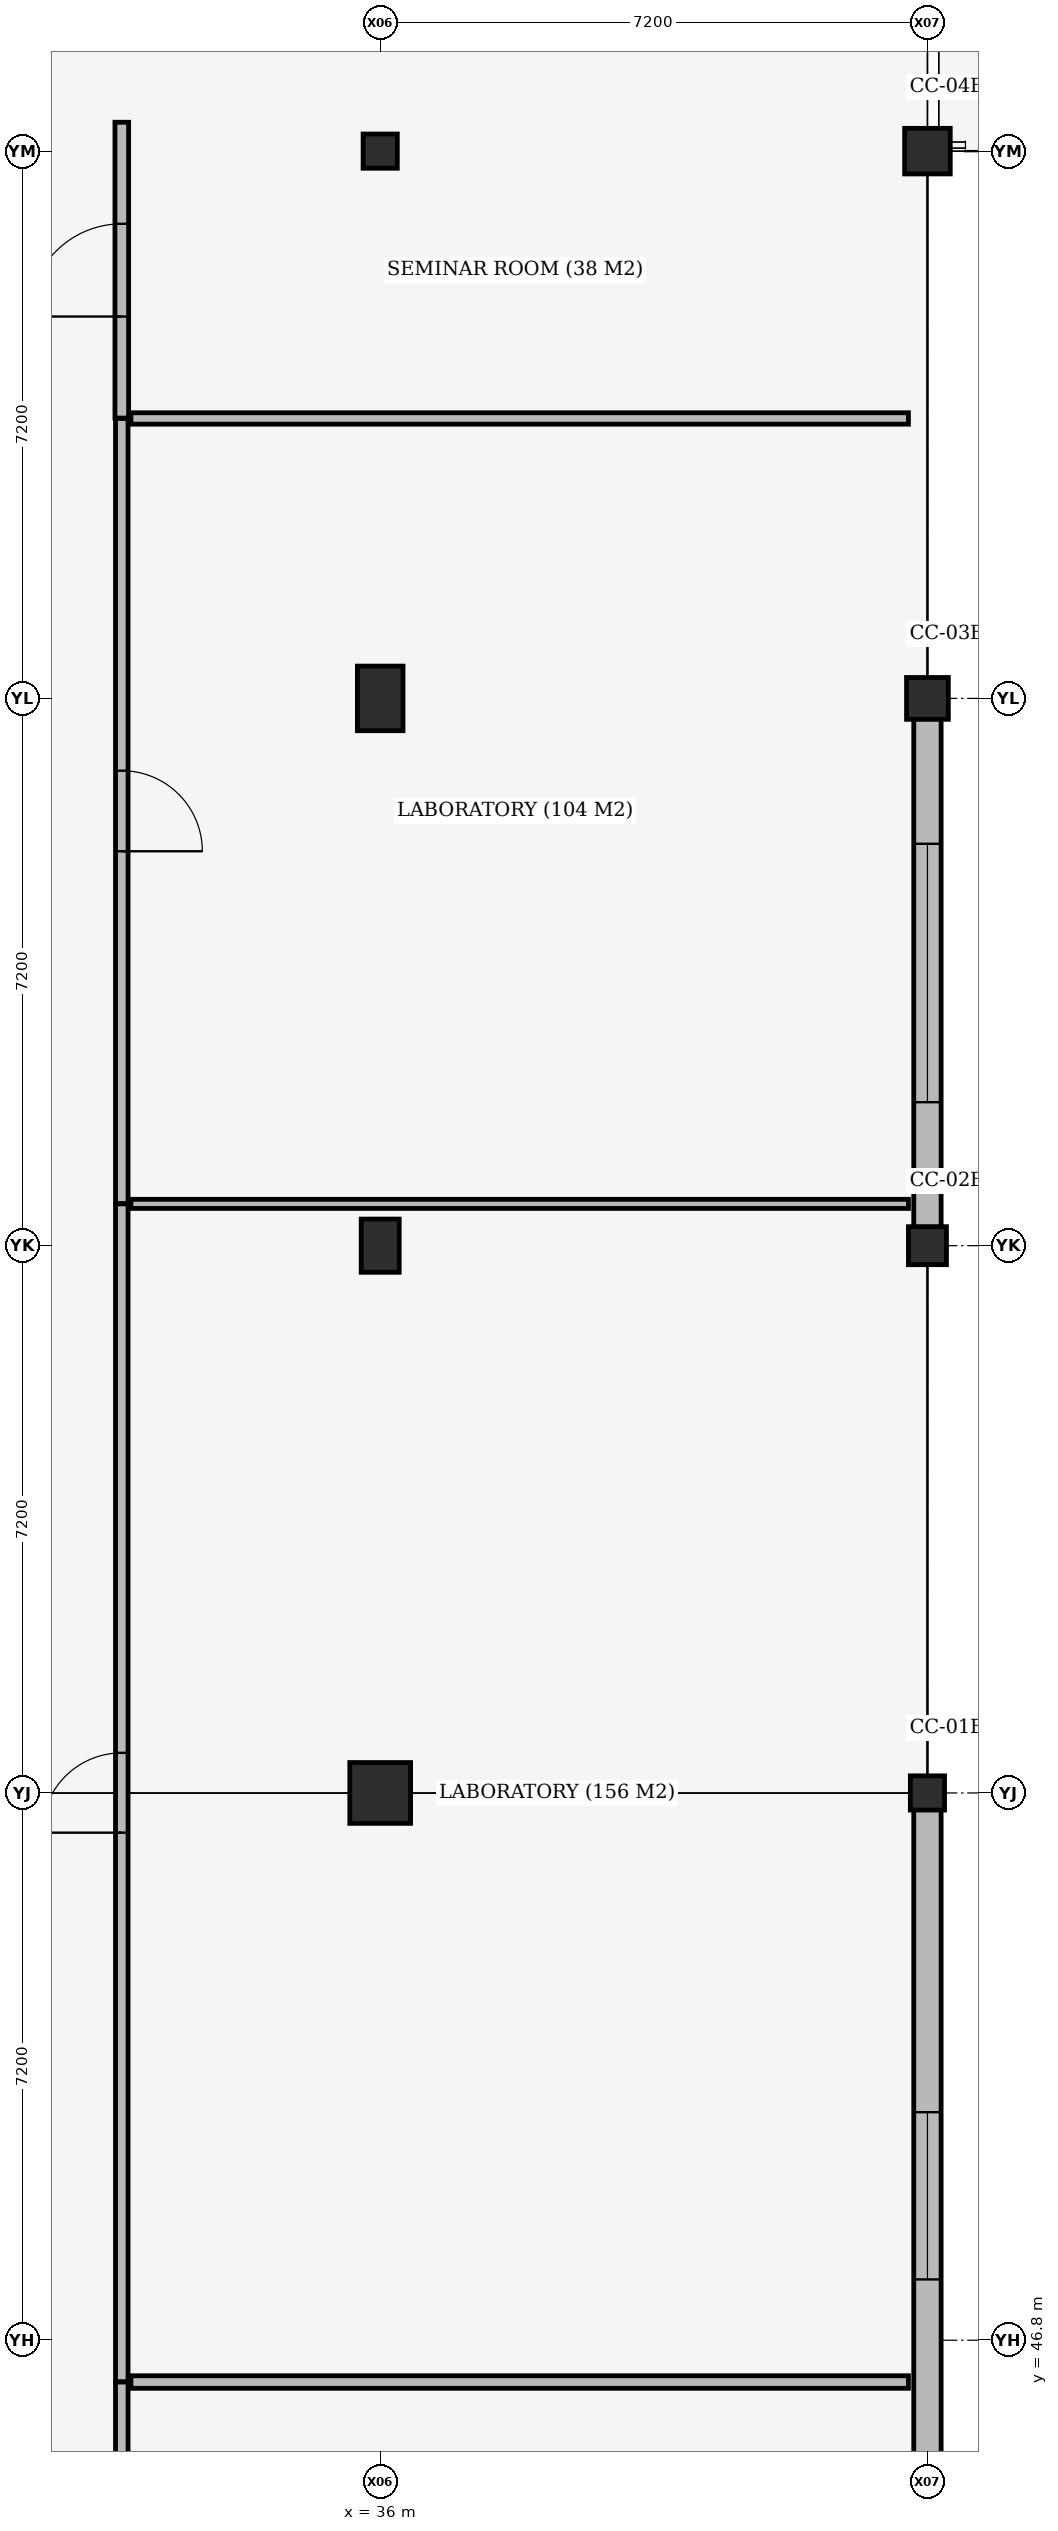
"""IFC4 building model, lengths in metres.
Left out: names, types, materials, properties, quantities, classifications, styles, units other than length and angle.
Written with IfcOpenShell. Run it as: python <this file> out.ifc"""

import sys

from ifc_helpers import new_model, si_unit, direction, frame, frame_2d, origin, origin_2d, place, context, subcontext, project, spatial, rectangle, extrude, element, fill, save


model = new_model("IFC4")
c1 = context("Model", 3, precision=1e-05, world=origin(), true_north=direction((0.0, 1.0)))
c2 = subcontext(c1, "Body", "Model", "MODEL_VIEW")
j1 = project(units=[si_unit("LENGTHUNIT", "METRE"), si_unit("PLANEANGLEUNIT", "RADIAN")], contexts=[c1])
p1 = place(None, origin())
s1 = spatial("IfcSite", under=j1, at=p1, CompositionType="ELEMENT")
p2 = place(p1, origin())
s2 = spatial("IfcBuilding", under=s1, at=p2, CompositionType="ELEMENT")
p3 = place(p2, frame((0.0, 0.0, 5.4)))
s3 = spatial("IfcBuildingStorey", under=s2, at=p3, CompositionType="ELEMENT", Elevation=5.4)
p4 = place(p3, frame((36.0, 54.0, 0.0), z_axis=(0.0, 0.0, 1.0), x_axis=(1.0, 0.0, 0.0)))
e1 = element("IfcColumn", 1, at=p4, inside=s3, PredefinedType="COLUMN", context=c2, shape_type="SweptSolid", body=[
    extrude(rectangle(XDim=0.8, YDim=0.8, at=origin_2d()), origin(), (0.0, 0.0, 1.0), 3.89),
])
p5 = place(p3, frame((36.0, 61.2, 0.0), z_axis=(0.0, 0.0, 1.0), x_axis=(1.0, 0.0, 0.0)))
e2 = element("IfcColumn", 2, at=p5, inside=s3, PredefinedType="COLUMN", context=c2, shape_type="SweptSolid", body=[
    extrude(rectangle(XDim=0.5, YDim=0.7, at=origin_2d()), origin(), (0.0, 0.0, 1.0), 3.89),
])
p6 = place(p3, frame((36.0, 68.4, 0.0), z_axis=(0.0, 0.0, 1.0), x_axis=(1.0, 0.0, 0.0)))
e3 = element("IfcColumn", 3, at=p6, inside=s3, PredefinedType="COLUMN", context=c2, shape_type="SweptSolid", body=[
    extrude(rectangle(XDim=0.6, YDim=0.85, at=origin_2d()), origin(), (0.0, 0.0, 1.0), 3.89),
])
for number, where, z_axis, x_axis in (
    (4, (36.0, 75.6, 0.0), (0.0, 0.0, 1.0), (1.0, 0.0, 0.0)),
    (5, (43.2, 54.0, 0.0), (0.0, 0.0, 1.0), (1.0, 0.0, 0.0)),
):
    element("IfcColumn", number, at=place(p3, frame(where, z_axis=z_axis, x_axis=x_axis)), inside=s3, PredefinedType="COLUMN", context=c2, shape_type="SweptSolid", body=[
        extrude(rectangle(XDim=0.45, YDim=0.45, at=origin_2d()), origin(), (0.0, 0.0, 1.0), 3.89),
    ])
p7 = place(p3, frame((43.2, 61.2, 0.0), z_axis=(0.0, 0.0, 1.0), x_axis=(1.0, 0.0, 0.0)))
e6 = element("IfcColumn", 6, at=p7, inside=s3, PredefinedType="COLUMN", context=c2, shape_type="SweptSolid", body=[
    extrude(rectangle(XDim=0.5, YDim=0.5, at=origin_2d()), origin(), (0.0, 0.0, 1.0), 3.89),
])
p8 = place(p3, frame((43.2, 68.4, 0.0), z_axis=(0.0, 0.0, 1.0), x_axis=(1.0, 0.0, 0.0)))
e7 = element("IfcColumn", 7, at=p8, inside=s3, PredefinedType="COLUMN", context=c2, shape_type="SweptSolid", body=[
    extrude(rectangle(XDim=0.55, YDim=0.55, at=origin_2d()), origin(), (0.0, 0.0, 1.0), 3.89),
])
p9 = place(p3, frame((43.2, 75.6, 0.0), z_axis=(0.0, 0.0, 1.0), x_axis=(1.0, 0.0, 0.0)))
e8 = element("IfcColumn", 8, at=p9, inside=s3, PredefinedType="COLUMN", context=c2, shape_type="SweptSolid", body=[
    extrude(rectangle(XDim=0.6, YDim=0.6, at=origin_2d()), origin(), (0.0, 0.0, 1.0), 3.89),
])
p10 = place(p3, frame((43.2, 53.783, 0.0), z_axis=(0.0, 0.0, 1.0), x_axis=(0.0, -1.0, 0.0)))
e9 = element("IfcWall", 9, at=p10, inside=s3, PredefinedType="STANDARD", context=c2, shape_type="SweptSolid", body=[
    extrude(rectangle(XDim=10.166, YDim=0.36, at=frame_2d((5.083, 0.0))), origin(), (0.0, 0.0, 1.0), 3.25),
])
p11 = place(p10, frame((3.983, 0.0, 0.9)))
e10 = element("IfcOpeningElement", 10, at=p11, cuts=e9, PredefinedType="OPENING", context=c2, shape_type="SweptSolid", body=[
    extrude(rectangle(XDim=2.2, YDim=2.2, at=frame_2d((1.1, 1.1))), frame((0.0, 0.19, 0.0), z_axis=(0.0, -1.0, 0.0), x_axis=(1.0, 0.0, 0.0)), (0.0, 0.0, 1.0), 0.38),
])
p12 = place(p3, frame((43.2, 68.133, 0.0), z_axis=(0.0, 0.0, 1.0), x_axis=(0.0, -1.0, 0.0)))
e11 = element("IfcWall", 11, at=p12, inside=s3, PredefinedType="STANDARD", context=c2, shape_type="SweptSolid", body=[
    extrude(rectangle(XDim=6.691, YDim=0.36, at=frame_2d((3.346, 0.0))), origin(), (0.0, 0.0, 1.0), 3.15),
])
p13 = place(p12, frame((1.646, 0.0, 0.9)))
e12 = element("IfcOpeningElement", 12, at=p13, cuts=e11, PredefinedType="OPENING", context=c2, shape_type="SweptSolid", body=[
    extrude(rectangle(XDim=3.4, YDim=1.5, at=frame_2d((1.7, 0.75))), frame((0.0, 0.19, 0.0), z_axis=(0.0, -1.0, 0.0), x_axis=(1.0, 0.0, 0.0)), (0.0, 0.0, 1.0), 0.38),
])
p14 = place(p3, frame((32.6, 33.338, 0.0), z_axis=(0.0, 0.0, 1.0), x_axis=(0.0, 1.0, 0.0)))
e13 = element("IfcWall", 13, at=p14, inside=s3, PredefinedType="PARTITIONING", context=c2, shape_type="SweptSolid", body=[
    extrude(rectangle(XDim=12.912, YDim=0.165, at=frame_2d((6.456, 0.0))), origin(), (0.0, 0.0, 1.0), 3.25),
])
p15 = place(p14, frame((5.926, 0.0, 0.0)))
e14 = element("IfcOpeningElement", 14, at=p15, cuts=e13, PredefinedType="OPENING", context=c2, shape_type="SweptSolid", body=[
    extrude(rectangle(XDim=1.06, YDim=2.2, at=frame_2d((0.53, 1.1))), frame((0.0, 0.093, 0.0), z_axis=(0.0, -1.0, 0.0), x_axis=(1.0, 0.0, 0.0)), (0.0, 0.0, 1.0), 0.185),
])
p16 = place(p3, frame((32.72, 46.25, 0.0), z_axis=(0.0, 0.0, 1.0), x_axis=(1.0, 0.0, 0.0)))
e15 = element("IfcWall", 15, at=p16, inside=s3, PredefinedType="PARTITIONING", context=c2, shape_type="SweptSolid", body=[
    extrude(rectangle(XDim=10.23, YDim=0.165, at=frame_2d((5.115, 0.0))), origin(), (0.0, 0.0, 1.0), 3.37),
])
p17 = place(p3, frame((32.6, 46.255, 0.0), z_axis=(0.0, 0.0, 1.0), x_axis=(0.0, 1.0, 0.0)))
e16 = element("IfcWall", 16, at=p17, inside=s3, PredefinedType="PARTITIONING", context=c2, shape_type="SweptSolid", body=[
    extrude(rectangle(XDim=15.495, YDim=0.165, at=frame_2d((7.748, 0.0))), origin(), (0.0, 0.0, 1.0), 3.15),
])
p18 = place(p17, frame((7.222, 0.0, 0.0)))
e17 = element("IfcOpeningElement", 17, at=p18, cuts=e16, PredefinedType="OPENING", context=c2, shape_type="SweptSolid", body=[
    extrude(rectangle(XDim=1.05, YDim=2.2, at=frame_2d((0.525, 1.1))), frame((0.0, 0.093, 0.0), z_axis=(0.0, -1.0, 0.0), x_axis=(1.0, 0.0, 0.0)), (0.0, 0.0, 1.0), 0.185),
])
p19 = place(p3, frame((32.72, 61.75, 0.0), z_axis=(0.0, 0.0, 1.0), x_axis=(1.0, 0.0, 0.0)))
e18 = element("IfcWall", 18, at=p19, inside=s3, PredefinedType="PARTITIONING", context=c2, shape_type="SweptSolid", body=[
    extrude(rectangle(XDim=10.23, YDim=0.12, at=frame_2d((5.115, 0.0))), origin(), (0.0, 0.0, 1.0), 3.25),
])
p20 = place(p3, frame((32.6, 61.755, 0.0), z_axis=(0.0, 0.0, 1.0), x_axis=(0.0, 1.0, 0.0)))
e19 = element("IfcWall", 19, at=p20, inside=s3, PredefinedType="PARTITIONING", context=c2, shape_type="SweptSolid", body=[
    extrude(rectangle(XDim=10.328, YDim=0.165, at=frame_2d((5.164, 0.0))), origin(), (0.0, 0.0, 1.0), 3.37),
])
p21 = place(p20, frame((4.634, 0.0, 0.0)))
e20 = element("IfcOpeningElement", 20, at=p21, cuts=e19, PredefinedType="OPENING", context=c2, shape_type="SweptSolid", body=[
    extrude(rectangle(XDim=1.06, YDim=2.2, at=frame_2d((0.53, 1.1))), frame((0.0, 0.093, 0.0), z_axis=(0.0, -1.0, 0.0), x_axis=(1.0, 0.0, 0.0)), (0.0, 0.0, 1.0), 0.185),
])
p22 = place(p3, frame((32.72, 72.083, 0.0), z_axis=(0.0, 0.0, 1.0), x_axis=(1.0, 0.0, 0.0)))
e21 = element("IfcWall", 21, at=p22, inside=s3, PredefinedType="PARTITIONING", context=c2, shape_type="SweptSolid", body=[
    extrude(rectangle(XDim=10.23, YDim=0.15, at=frame_2d((5.115, 0.0))), origin(), (0.0, 0.0, 1.0), 3.21),
])
p23 = place(p3, frame((32.6, 72.088, 0.0), z_axis=(0.0, 0.0, 1.0), x_axis=(0.0, 1.0, 0.0)))
e22 = element("IfcWall", 22, at=p23, inside=s3, PredefinedType="PARTITIONING", context=c2, shape_type="SweptSolid", body=[
    extrude(rectangle(XDim=3.892, YDim=0.18, at=frame_2d((1.946, 0.0))), origin(), (0.0, 0.0, 1.0), 3.31),
])
p24 = place(p23, frame((1.336, 0.0, 0.0)))
e23 = element("IfcOpeningElement", 23, at=p24, cuts=e22, PredefinedType="OPENING", context=c2, shape_type="SweptSolid", body=[
    extrude(rectangle(XDim=1.22, YDim=2.25, at=frame_2d((0.61, 1.125))), frame((0.0, 0.1, 0.0), z_axis=(0.0, -1.0, 0.0), x_axis=(1.0, 0.0, 0.0)), (0.0, 0.0, 1.0), 0.2),
])
p25 = place(p11, origin())
e24 = element("IfcWindow", 24, at=p25, inside=s3, PartitioningType="DOUBLE_PANEL_VERTICAL", PredefinedType="WINDOW", context=c2, shape_type="SweptSolid", body=[
    extrude(rectangle(XDim=2.2, YDim=2.2, at=frame_2d((1.1, 1.1))), frame((0.0, 0.03, 0.0), z_axis=(0.0, -1.0, 0.0), x_axis=(1.0, 0.0, 0.0)), (0.0, 0.0, 1.0), 0.06),
])
fill(e10, e24)
p26 = place(p13, origin())
e25 = element("IfcWindow", 25, at=p26, inside=s3, PartitioningType="DOUBLE_PANEL_VERTICAL", PredefinedType="WINDOW", context=c2, shape_type="SweptSolid", body=[
    extrude(rectangle(XDim=3.4, YDim=1.5, at=frame_2d((1.7, 0.75))), frame((0.0, 0.03, 0.0), z_axis=(0.0, -1.0, 0.0), x_axis=(1.0, 0.0, 0.0)), (0.0, 0.0, 1.0), 0.06),
])
fill(e12, e25)
p27 = place(p18, origin())
e26 = element("IfcDoor", 26, at=p27, inside=s3, OperationType="SINGLE_SWING_LEFT", PredefinedType="DOOR", context=c2, shape_type="SweptSolid", body=[
    extrude(rectangle(XDim=1.05, YDim=2.2, at=frame_2d((0.525, 1.1))), frame((0.0, 0.025, 0.0), z_axis=(0.0, -1.0, 0.0), x_axis=(1.0, 0.0, 0.0)), (0.0, 0.0, 1.0), 0.05),
])
fill(e17, e26)
p28 = place(p21, origin())
e27 = element("IfcDoor", 27, at=p28, inside=s3, OperationType="SINGLE_SWING_RIGHT", PredefinedType="DOOR", context=c2, shape_type="SweptSolid", body=[
    extrude(rectangle(XDim=1.06, YDim=2.2, at=frame_2d((0.53, 1.1))), frame((0.0, 0.025, 0.0), z_axis=(0.0, -1.0, 0.0), x_axis=(1.0, 0.0, 0.0)), (0.0, 0.0, 1.0), 0.05),
])
fill(e20, e27)
p29 = place(p24, origin())
e28 = element("IfcDoor", 28, at=p29, inside=s3, OperationType="SINGLE_SWING_LEFT", PredefinedType="DOOR", context=c2, shape_type="SweptSolid", body=[
    extrude(rectangle(XDim=1.22, YDim=2.25, at=frame_2d((0.61, 1.125))), frame((0.0, 0.025, 0.0), z_axis=(0.0, -1.0, 0.0), x_axis=(1.0, 0.0, 0.0)), (0.0, 0.0, 1.0), 0.05),
])
fill(e23, e28)
save(model, sys.argv[1])
